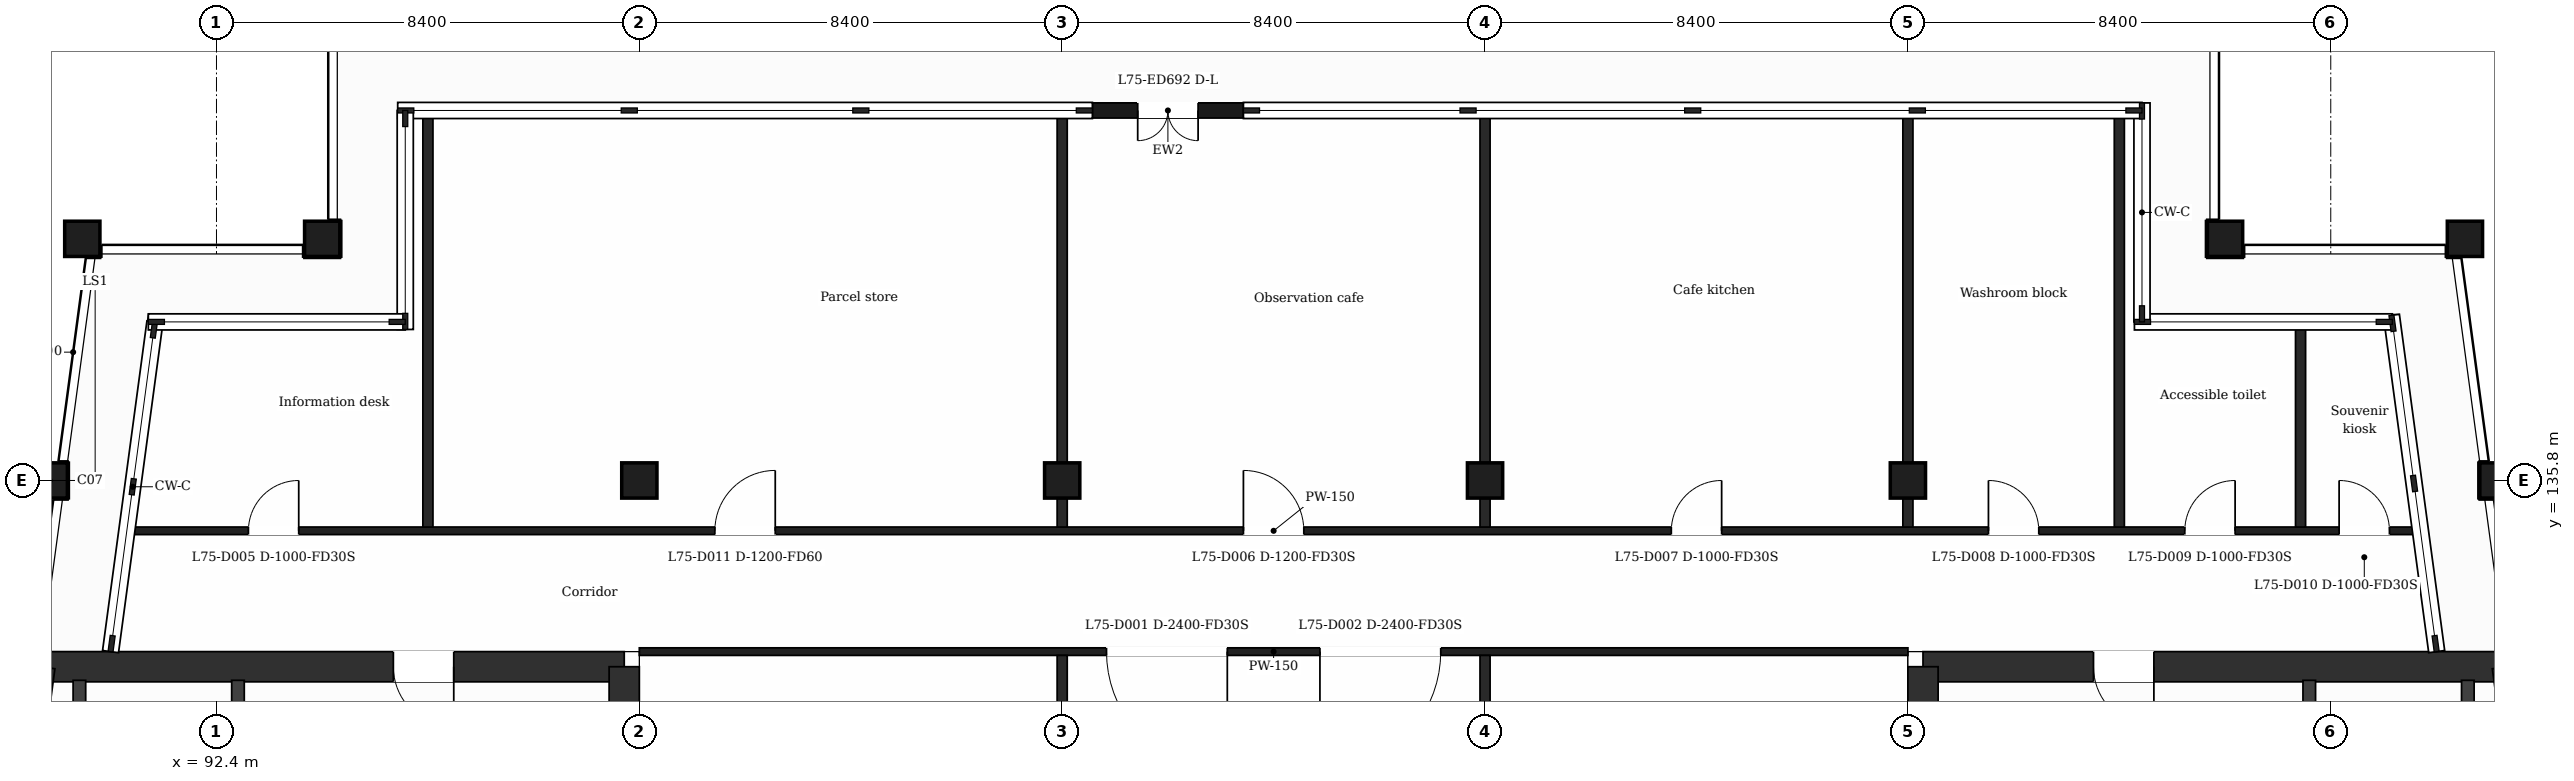
"""IFC4 building model, lengths in metres.
Left out: names, types, materials, properties, quantities, classifications, styles, units other than length and angle.
Written with IfcOpenShell. Run it as: python <this file> out.ifc"""

import sys

from ifc_helpers import new_model, si_unit, direction, frame, frame_2d, origin, origin_2d, place, context, subcontext, project, spatial, rectangle, extrude, element, fill, save


model = new_model("IFC4")
c1 = context("Model", 3, precision=1e-05, world=origin(), true_north=direction((0.0, 1.0)))
c2 = subcontext(c1, "Body", "Model", "MODEL_VIEW")
j1 = project(units=[si_unit("LENGTHUNIT", "METRE"), si_unit("PLANEANGLEUNIT", "RADIAN")], contexts=[c1])
p1 = place(None, origin())
s1 = spatial("IfcSite", under=j1, at=p1, CompositionType="ELEMENT")
p2 = place(p1, origin())
s2 = spatial("IfcBuilding", under=s1, at=p2, CompositionType="ELEMENT")
p3 = place(p2, frame((0.0, 0.0, 307.9)))
s3 = spatial("IfcBuildingStorey", under=s2, at=p3, CompositionType="ELEMENT", Elevation=307.9)
p4 = place(p3, frame((88.893, 132.1, 0.0), z_axis=(0.0, 0.0, 1.0), x_axis=(1.0, 0.0, 0.0)))
e1 = element("IfcWall", 1, at=p4, inside=s3, PredefinedType="SHEAR", context=c2, shape_type="SweptSolid", body=[
    extrude(rectangle(XDim=11.607, YDim=0.6, at=frame_2d((5.803, 0.0))), origin(), (0.0, 0.0, 1.0), 7.5),
])
p5 = place(p4, frame((7.021, 0.0, 0.0)))
e2 = element("IfcOpeningElement", 2, at=p5, cuts=e1, PredefinedType="OPENING", context=c2, shape_type="SweptSolid", body=[
    extrude(rectangle(XDim=1.2, YDim=2.1, at=frame_2d((0.6, 1.05))), frame((0.0, 0.31, 0.0), z_axis=(0.0, -1.0, 0.0), x_axis=(1.0, 0.0, 0.0)), (0.0, 0.0, 1.0), 0.62),
])
p6 = place(p3, frame((100.5, 132.1, 0.0), z_axis=(0.0, 0.0, 1.0), x_axis=(0.0, -1.0, 0.0)))
e3 = element("IfcWall", 3, at=p6, inside=s3, PredefinedType="SHEAR", context=c2, shape_type="SweptSolid", body=[
    extrude(rectangle(XDim=15.8, YDim=0.6, at=frame_2d((7.9, 0.0))), origin(), (0.0, 0.0, 1.0), 7.5),
])
p7 = place(p6, frame((7.95, 0.0, 0.0)))
e4 = element("IfcOpeningElement", 4, at=p7, cuts=e3, PredefinedType="OPENING", context=c2, shape_type="SweptSolid", body=[
    extrude(rectangle(XDim=1.4, YDim=2.1, at=frame_2d((0.7, 1.05))), frame((0.0, 0.31, 0.0), z_axis=(0.0, -1.0, 0.0), x_axis=(1.0, 0.0, 0.0)), (0.0, 0.0, 1.0), 0.62),
])
p8 = place(p3, frame((86.766, 116.3, 0.0), z_axis=(0.0, 0.0, 1.0), x_axis=(0.13341345841, 0.991060466932, 0.0)))
e5 = element("IfcWall", 5, at=p8, inside=s3, PredefinedType="SHEAR", context=c2, shape_type="SweptSolid", body=[
    extrude(rectangle(XDim=15.943, YDim=0.6, at=frame_2d((7.971, 0.0))), origin(), (0.0, 0.0, 1.0), 7.5),
])
p9 = place(p3, frame((126.3, 132.1, 0.0), z_axis=(0.0, 0.0, 1.0), x_axis=(1.0, 0.0, 0.0)))
e6 = element("IfcWall", 6, at=p9, inside=s3, PredefinedType="SHEAR", context=c2, shape_type="SweptSolid", body=[
    extrude(rectangle(XDim=11.607, YDim=0.6, at=frame_2d((5.803, 0.0))), origin(), (0.0, 0.0, 1.0), 7.5),
])
p10 = place(p9, frame((3.386, 0.0, 0.0)))
e7 = element("IfcOpeningElement", 7, at=p10, cuts=e6, PredefinedType="OPENING", context=c2, shape_type="SweptSolid", body=[
    extrude(rectangle(XDim=1.2, YDim=2.1, at=frame_2d((0.6, 1.05))), frame((0.0, 0.31, 0.0), z_axis=(0.0, -1.0, 0.0), x_axis=(1.0, 0.0, 0.0)), (0.0, 0.0, 1.0), 0.62),
])
p11 = place(p3, frame((137.907, 132.1, 0.0), z_axis=(0.0, 0.0, 1.0), x_axis=(0.13341345841, -0.991060466932, 0.0)))
e8 = element("IfcWall", 8, at=p11, inside=s3, PredefinedType="SHEAR", context=c2, shape_type="SweptSolid", body=[
    extrude(rectangle(XDim=15.943, YDim=0.6, at=frame_2d((7.971, 0.0))), origin(), (0.0, 0.0, 1.0), 7.5),
])
p12 = place(p3, frame((126.3, 116.3, 0.0), z_axis=(0.0, 0.0, 1.0), x_axis=(0.0, 1.0, 0.0)))
e9 = element("IfcWall", 9, at=p12, inside=s3, PredefinedType="SHEAR", context=c2, shape_type="SweptSolid", body=[
    extrude(rectangle(XDim=15.8, YDim=0.6, at=frame_2d((7.9, 0.0))), origin(), (0.0, 0.0, 1.0), 7.5),
])
p13 = place(p12, frame((6.45, 0.0, 0.0)))
e10 = element("IfcOpeningElement", 10, at=p13, cuts=e9, PredefinedType="OPENING", context=c2, shape_type="SweptSolid", body=[
    extrude(rectangle(XDim=1.4, YDim=2.1, at=frame_2d((0.7, 1.05))), frame((0.0, 0.31, 0.0), z_axis=(0.0, -1.0, 0.0), x_axis=(1.0, 0.0, 0.0)), (0.0, 0.0, 1.0), 0.62),
])
for number, where, z_axis, x_axis in (
    (11, (94.5, 140.6, 0.0), (0.0, 0.0, 1.0), (1.0, 0.0, 0.0)),
    (12, (132.3, 140.6, 0.0), (0.0, 0.0, 1.0), (1.0, 0.0, 0.0)),
    (13, (89.735, 140.6, 0.0), (0.0, 0.0, 1.0), (1.0, 0.0, 0.0)),
    (14, (137.065, 140.6, 0.0), (0.0, 0.0, 1.0), (1.0, 0.0, 0.0)),
    (15, (100.8, 135.8, 0.0), (0.0, 0.0, 1.0), (1.0, 0.0, 0.0)),
    (16, (109.2, 135.8, 0.0), (0.0, 0.0, 1.0), (1.0, 0.0, 0.0)),
    (17, (117.6, 135.8, 0.0), (0.0, 0.0, 1.0), (1.0, 0.0, 0.0)),
    (18, (126.0, 135.8, 0.0), (0.0, 0.0, 1.0), (1.0, 0.0, 0.0)),
    (19, (89.088, 135.8, 0.0), (0.0, 0.0, 1.0), (1.0, 0.0, 0.0)),
    (20, (137.711, 135.8, 0.0), (0.0, 0.0, 1.0), (1.0, 0.0, 0.0)),
):
    element("IfcColumn", number, at=place(p3, frame(where, z_axis=z_axis, x_axis=x_axis)), inside=s3, PredefinedType="COLUMN", context=c2, shape_type="SweptSolid", body=[
        extrude(rectangle(XDim=0.7, YDim=0.7, at=origin_2d()), origin(), (0.0, 0.0, 1.0), 7.5),
    ])
p14 = place(p3, frame((112.8, 143.15, 0.0), z_axis=(0.0, 0.0, 1.0), x_axis=(-1.0, 0.0, 0.0)))
e21 = element("IfcWall", 21, at=p14, inside=s3, PredefinedType="SOLIDWALL", context=c2, shape_type="SweptSolid", body=[
    extrude(rectangle(XDim=3.0, YDim=0.3, at=frame_2d((1.5, 0.0))), origin(), (0.0, 0.0, 1.0), 7.05),
])
p15 = place(p14, frame((0.9, 0.0, 0.0)))
e22 = element("IfcOpeningElement", 22, at=p15, cuts=e21, PredefinedType="OPENING", context=c2, shape_type="SweptSolid", body=[
    extrude(rectangle(XDim=1.2, YDim=2.4, at=frame_2d((0.6, 1.2))), frame((0.0, 0.16, 0.0), z_axis=(0.0, -1.0, 0.0), x_axis=(1.0, 0.0, 0.0)), (0.0, 0.0, 1.0), 0.32),
])
p16 = place(p3, frame((100.8, 132.4, 0.0), z_axis=(0.0, 0.0, 1.0), x_axis=(1.0, 0.0, 0.0)))
e23 = element("IfcWall", 23, at=p16, inside=s3, PredefinedType="PARTITIONING", context=c2, shape_type="SweptSolid", body=[
    extrude(rectangle(XDim=25.2, YDim=0.15, at=frame_2d((12.6, 0.0))), origin(), (0.0, 0.0, 1.0), 7.05),
])
p17 = place(p16, frame((9.28, 0.0, 0.0)))
e24 = element("IfcOpeningElement", 24, at=p17, cuts=e23, PredefinedType="OPENING", context=c2, shape_type="SweptSolid", body=[
    extrude(rectangle(XDim=2.4, YDim=2.1, at=frame_2d((1.2, 1.05))), frame((0.0, 0.085, 0.0), z_axis=(0.0, -1.0, 0.0), x_axis=(1.0, 0.0, 0.0)), (0.0, 0.0, 1.0), 0.17),
])
p18 = place(p16, frame((13.52, 0.0, 0.0)))
e25 = element("IfcOpeningElement", 25, at=p18, cuts=e23, PredefinedType="OPENING", context=c2, shape_type="SweptSolid", body=[
    extrude(rectangle(XDim=2.4, YDim=2.1, at=frame_2d((1.2, 1.05))), frame((0.0, 0.085, 0.0), z_axis=(0.0, -1.0, 0.0), x_axis=(1.0, 0.0, 0.0)), (0.0, 0.0, 1.0), 0.17),
])
p19 = place(p3, frame((90.73, 134.8, 0.0), z_axis=(0.0, 0.0, 1.0), x_axis=(1.0, 0.0, 0.0)))
e26 = element("IfcWall", 26, at=p19, inside=s3, PredefinedType="PARTITIONING", context=c2, shape_type="SweptSolid", body=[
    extrude(rectangle(XDim=45.341, YDim=0.15, at=frame_2d((22.67, 0.0))), origin(), (0.0, 0.0, 1.0), 7.05),
])
p20 = place(p19, frame((2.304, 0.0, 0.0)))
e27 = element("IfcOpeningElement", 27, at=p20, cuts=e26, PredefinedType="OPENING", context=c2, shape_type="SweptSolid", body=[
    extrude(rectangle(XDim=1.0, YDim=2.1, at=frame_2d((0.5, 1.05))), frame((0.0, 0.085, 0.0), z_axis=(0.0, -1.0, 0.0), x_axis=(1.0, 0.0, 0.0)), (0.0, 0.0, 1.0), 0.17),
])
p21 = place(p19, frame((22.07, 0.0, 0.0)))
e28 = element("IfcOpeningElement", 28, at=p21, cuts=e26, PredefinedType="OPENING", context=c2, shape_type="SweptSolid", body=[
    extrude(rectangle(XDim=1.2, YDim=2.1, at=frame_2d((0.6, 1.05))), frame((0.0, 0.085, 0.0), z_axis=(0.0, -1.0, 0.0), x_axis=(1.0, 0.0, 0.0)), (0.0, 0.0, 1.0), 0.17),
])
p22 = place(p19, frame((30.57, 0.0, 0.0)))
e29 = element("IfcOpeningElement", 29, at=p22, cuts=e26, PredefinedType="OPENING", context=c2, shape_type="SweptSolid", body=[
    extrude(rectangle(XDim=1.0, YDim=2.1, at=frame_2d((0.5, 1.05))), frame((0.0, 0.085, 0.0), z_axis=(0.0, -1.0, 0.0), x_axis=(1.0, 0.0, 0.0)), (0.0, 0.0, 1.0), 0.17),
])
p23 = place(p19, frame((36.87, 0.0, 0.0)))
e30 = element("IfcOpeningElement", 30, at=p23, cuts=e26, PredefinedType="OPENING", context=c2, shape_type="SweptSolid", body=[
    extrude(rectangle(XDim=1.0, YDim=2.1, at=frame_2d((0.5, 1.05))), frame((0.0, 0.085, 0.0), z_axis=(0.0, -1.0, 0.0), x_axis=(1.0, 0.0, 0.0)), (0.0, 0.0, 1.0), 0.17),
])
p24 = place(p19, frame((40.77, 0.0, 0.0)))
e31 = element("IfcOpeningElement", 31, at=p24, cuts=e26, PredefinedType="OPENING", context=c2, shape_type="SweptSolid", body=[
    extrude(rectangle(XDim=1.0, YDim=2.1, at=frame_2d((0.5, 1.05))), frame((0.0, 0.085, 0.0), z_axis=(0.0, -1.0, 0.0), x_axis=(1.0, 0.0, 0.0)), (0.0, 0.0, 1.0), 0.17),
])
p25 = place(p19, frame((43.836, 0.0, 0.0)))
e32 = element("IfcOpeningElement", 32, at=p25, cuts=e26, PredefinedType="OPENING", context=c2, shape_type="SweptSolid", body=[
    extrude(rectangle(XDim=1.0, YDim=2.1, at=frame_2d((0.5, 1.05))), frame((0.0, 0.085, 0.0), z_axis=(0.0, -1.0, 0.0), x_axis=(1.0, 0.0, 0.0)), (0.0, 0.0, 1.0), 0.17),
])
p26 = place(p19, frame((11.57, 0.0, 0.0)))
e33 = element("IfcOpeningElement", 33, at=p26, cuts=e26, PredefinedType="OPENING", context=c2, shape_type="SweptSolid", body=[
    extrude(rectangle(XDim=1.2, YDim=2.1, at=frame_2d((0.6, 1.05))), frame((0.0, 0.085, 0.0), z_axis=(0.0, -1.0, 0.0), x_axis=(1.0, 0.0, 0.0)), (0.0, 0.0, 1.0), 0.17),
])
p27 = place(p3, frame((89.677, 124.575, 0.0), z_axis=(0.0, 0.0, 1.0), x_axis=(0.0, 1.0, 0.0)))
e34 = element("IfcWall", 34, at=p27, inside=s3, PredefinedType="PARTITIONING", context=c2, shape_type="SweptSolid", body=[
    extrude(rectangle(XDim=7.255, YDim=0.25, at=frame_2d((3.627, 0.0))), origin(), (0.0, 0.0, 1.0), 7.05),
])
p28 = place(p3, frame((92.827, 124.575, 0.0), z_axis=(0.0, 0.0, 1.0), x_axis=(0.0, 1.0, 0.0)))
e35 = element("IfcWall", 35, at=p28, inside=s3, PredefinedType="PARTITIONING", context=c2, shape_type="SweptSolid", body=[
    extrude(rectangle(XDim=7.255, YDim=0.25, at=frame_2d((3.627, 0.0))), origin(), (0.0, 0.0, 1.0), 7.05),
])
p29 = place(p28, frame((5.325, 0.0, 0.0)))
e36 = element("IfcOpeningElement", 36, at=p29, cuts=e35, PredefinedType="OPENING", context=c2, shape_type="SweptSolid", body=[
    extrude(rectangle(XDim=1.0, YDim=2.1, at=frame_2d((0.5, 1.05))), frame((0.0, 0.135, 0.0), z_axis=(0.0, -1.0, 0.0), x_axis=(1.0, 0.0, 0.0)), (0.0, 0.0, 1.0), 0.27),
])
p30 = place(p3, frame((96.6, 134.875, 0.0), z_axis=(0.0, 0.0, 1.0), x_axis=(0.0, 1.0, 0.0)))
e37 = element("IfcWall", 37, at=p30, inside=s3, PredefinedType="PARTITIONING", context=c2, shape_type="SweptSolid", body=[
    extrude(rectangle(XDim=8.165, YDim=0.2, at=frame_2d((4.083, 0.0))), origin(), (0.0, 0.0, 1.0), 7.05),
])
p31 = place(p3, frame((109.2, 122.1, 0.0), z_axis=(0.0, 0.0, 1.0), x_axis=(0.0, 1.0, 0.0)))
e38 = element("IfcWall", 38, at=p31, inside=s3, PredefinedType="PARTITIONING", context=c2, shape_type="SweptSolid", body=[
    extrude(rectangle(XDim=10.225, YDim=0.2, at=frame_2d((5.112, 0.0))), origin(), (0.0, 0.0, 1.0), 7.05),
])
p32 = place(p31, frame((4.5, 0.0, 0.0)))
e39 = element("IfcOpeningElement", 39, at=p32, cuts=e38, PredefinedType="OPENING", context=c2, shape_type="SweptSolid", body=[
    extrude(rectangle(XDim=1.2, YDim=2.1, at=frame_2d((0.6, 1.05))), frame((0.0, 0.11, 0.0), z_axis=(0.0, -1.0, 0.0), x_axis=(1.0, 0.0, 0.0)), (0.0, 0.0, 1.0), 0.22),
])
p33 = place(p3, frame((109.2, 134.875, 0.0), z_axis=(0.0, 0.0, 1.0), x_axis=(0.0, 1.0, 0.0)))
e40 = element("IfcWall", 40, at=p33, inside=s3, PredefinedType="PARTITIONING", context=c2, shape_type="SweptSolid", body=[
    extrude(rectangle(XDim=8.165, YDim=0.2, at=frame_2d((4.083, 0.0))), origin(), (0.0, 0.0, 1.0), 7.05),
])
p34 = place(p3, frame((117.6, 122.1, 0.0), z_axis=(0.0, 0.0, 1.0), x_axis=(0.0, 1.0, 0.0)))
e41 = element("IfcWall", 41, at=p34, inside=s3, PredefinedType="PARTITIONING", context=c2, shape_type="SweptSolid", body=[
    extrude(rectangle(XDim=10.225, YDim=0.2, at=frame_2d((5.112, 0.0))), origin(), (0.0, 0.0, 1.0), 7.05),
])
p35 = place(p34, frame((4.6, 0.0, 0.0)))
e42 = element("IfcOpeningElement", 42, at=p35, cuts=e41, PredefinedType="OPENING", context=c2, shape_type="SweptSolid", body=[
    extrude(rectangle(XDim=1.0, YDim=2.1, at=frame_2d((0.5, 1.05))), frame((0.0, 0.11, 0.0), z_axis=(0.0, -1.0, 0.0), x_axis=(1.0, 0.0, 0.0)), (0.0, 0.0, 1.0), 0.22),
])
for number, where, z_axis, x_axis in (
    (43, (117.6, 134.875, 0.0), (0.0, 0.0, 1.0), (0.0, 1.0, 0.0)),
    (44, (126.0, 134.875, 0.0), (0.0, 0.0, 1.0), (0.0, 1.0, 0.0)),
    (45, (130.2, 134.875, 0.0), (0.0, 0.0, 1.0), (0.0, 1.0, 0.0)),
):
    element("IfcWall", number, at=place(p3, frame(where, z_axis=z_axis, x_axis=x_axis)), inside=s3, PredefinedType="PARTITIONING", context=c2, shape_type="SweptSolid", body=[
        extrude(rectangle(XDim=8.165, YDim=0.2, at=frame_2d((4.083, 0.0))), origin(), (0.0, 0.0, 1.0), 7.05),
    ])
p36 = place(p3, frame((133.8, 134.875, 0.0), z_axis=(0.0, 0.0, 1.0), x_axis=(0.0, 1.0, 0.0)))
e46 = element("IfcWall", 46, at=p36, inside=s3, PredefinedType="PARTITIONING", context=c2, shape_type="SweptSolid", body=[
    extrude(rectangle(XDim=3.965, YDim=0.2, at=frame_2d((1.982, 0.0))), origin(), (0.0, 0.0, 1.0), 7.05),
])
p37 = place(p3, frame((133.973, 124.575, 0.0), z_axis=(0.0, 0.0, 1.0), x_axis=(0.0, 1.0, 0.0)))
e47 = element("IfcWall", 47, at=p37, inside=s3, PredefinedType="PARTITIONING", context=c2, shape_type="SweptSolid", body=[
    extrude(rectangle(XDim=7.255, YDim=0.25, at=frame_2d((3.627, 0.0))), origin(), (0.0, 0.0, 1.0), 7.05),
])
p38 = place(p37, frame((5.325, 0.0, 0.0)))
e48 = element("IfcOpeningElement", 48, at=p38, cuts=e47, PredefinedType="OPENING", context=c2, shape_type="SweptSolid", body=[
    extrude(rectangle(XDim=1.0, YDim=2.1, at=frame_2d((0.5, 1.05))), frame((0.0, 0.135, 0.0), z_axis=(0.0, -1.0, 0.0), x_axis=(1.0, 0.0, 0.0)), (0.0, 0.0, 1.0), 0.27),
])
p39 = place(p3, frame((137.123, 124.575, 0.0), z_axis=(0.0, 0.0, 1.0), x_axis=(0.0, 1.0, 0.0)))
e49 = element("IfcWall", 49, at=p39, inside=s3, PredefinedType="PARTITIONING", context=c2, shape_type="SweptSolid", body=[
    extrude(rectangle(XDim=7.255, YDim=0.25, at=frame_2d((3.627, 0.0))), origin(), (0.0, 0.0, 1.0), 7.05),
])
p40 = place(p15, origin())
e50 = element("IfcDoor", 50, at=p40, inside=s3, OperationType="DOUBLE_DOOR_SINGLE_SWING", PredefinedType="DOOR", context=c2, shape_type="SweptSolid", body=[
    extrude(rectangle(XDim=1.2, YDim=2.4, at=frame_2d((0.6, 1.2))), frame((0.0, 0.025, 0.0), z_axis=(0.0, -1.0, 0.0), x_axis=(1.0, 0.0, 0.0)), (0.0, 0.0, 1.0), 0.05),
])
fill(e22, e50)
p41 = place(p17, origin())
e51 = element("IfcDoor", 51, at=p41, inside=s3, OperationType="SINGLE_SWING_RIGHT", PredefinedType="DOOR", context=c2, shape_type="SweptSolid", body=[
    extrude(rectangle(XDim=2.4, YDim=2.1, at=frame_2d((1.2, 1.05))), frame((0.0, 0.025, 0.0), z_axis=(0.0, -1.0, 0.0), x_axis=(1.0, 0.0, 0.0)), (0.0, 0.0, 1.0), 0.05),
])
fill(e24, e51)
p42 = place(p18, origin())
e52 = element("IfcDoor", 52, at=p42, inside=s3, OperationType="SINGLE_SWING_LEFT", PredefinedType="DOOR", context=c2, shape_type="SweptSolid", body=[
    extrude(rectangle(XDim=2.4, YDim=2.1, at=frame_2d((1.2, 1.05))), frame((0.0, 0.025, 0.0), z_axis=(0.0, -1.0, 0.0), x_axis=(1.0, 0.0, 0.0)), (0.0, 0.0, 1.0), 0.05),
])
fill(e25, e52)
p43 = place(p20, origin())
e53 = element("IfcDoor", 53, at=p43, inside=s3, OperationType="SINGLE_SWING_RIGHT", PredefinedType="DOOR", context=c2, shape_type="SweptSolid", body=[
    extrude(rectangle(XDim=1.0, YDim=2.1, at=frame_2d((0.5, 1.05))), frame((0.0, 0.025, 0.0), z_axis=(0.0, -1.0, 0.0), x_axis=(1.0, 0.0, 0.0)), (0.0, 0.0, 1.0), 0.05),
])
fill(e27, e53)
p44 = place(p21, origin())
e54 = element("IfcDoor", 54, at=p44, inside=s3, OperationType="SINGLE_SWING_LEFT", PredefinedType="DOOR", context=c2, shape_type="SweptSolid", body=[
    extrude(rectangle(XDim=1.2, YDim=2.1, at=frame_2d((0.6, 1.05))), frame((0.0, 0.025, 0.0), z_axis=(0.0, -1.0, 0.0), x_axis=(1.0, 0.0, 0.0)), (0.0, 0.0, 1.0), 0.05),
])
fill(e28, e54)
p45 = place(p22, origin())
e55 = element("IfcDoor", 55, at=p45, inside=s3, OperationType="SINGLE_SWING_RIGHT", PredefinedType="DOOR", context=c2, shape_type="SweptSolid", body=[
    extrude(rectangle(XDim=1.0, YDim=2.1, at=frame_2d((0.5, 1.05))), frame((0.0, 0.025, 0.0), z_axis=(0.0, -1.0, 0.0), x_axis=(1.0, 0.0, 0.0)), (0.0, 0.0, 1.0), 0.05),
])
fill(e29, e55)
p46 = place(p23, origin())
e56 = element("IfcDoor", 56, at=p46, inside=s3, OperationType="SINGLE_SWING_LEFT", PredefinedType="DOOR", context=c2, shape_type="SweptSolid", body=[
    extrude(rectangle(XDim=1.0, YDim=2.1, at=frame_2d((0.5, 1.05))), frame((0.0, 0.025, 0.0), z_axis=(0.0, -1.0, 0.0), x_axis=(1.0, 0.0, 0.0)), (0.0, 0.0, 1.0), 0.05),
])
fill(e30, e56)
p47 = place(p24, origin())
e57 = element("IfcDoor", 57, at=p47, inside=s3, OperationType="SINGLE_SWING_RIGHT", PredefinedType="DOOR", context=c2, shape_type="SweptSolid", body=[
    extrude(rectangle(XDim=1.0, YDim=2.1, at=frame_2d((0.5, 1.05))), frame((0.0, 0.025, 0.0), z_axis=(0.0, -1.0, 0.0), x_axis=(1.0, 0.0, 0.0)), (0.0, 0.0, 1.0), 0.05),
])
fill(e31, e57)
p48 = place(p25, origin())
e58 = element("IfcDoor", 58, at=p48, inside=s3, OperationType="SINGLE_SWING_LEFT", PredefinedType="DOOR", context=c2, shape_type="SweptSolid", body=[
    extrude(rectangle(XDim=1.0, YDim=2.1, at=frame_2d((0.5, 1.05))), frame((0.0, 0.025, 0.0), z_axis=(0.0, -1.0, 0.0), x_axis=(1.0, 0.0, 0.0)), (0.0, 0.0, 1.0), 0.05),
])
fill(e32, e58)
p49 = place(p26, origin())
e59 = element("IfcDoor", 59, at=p49, inside=s3, OperationType="SINGLE_SWING_RIGHT", PredefinedType="DOOR", context=c2, shape_type="SweptSolid", body=[
    extrude(rectangle(XDim=1.2, YDim=2.1, at=frame_2d((0.6, 1.05))), frame((0.0, 0.025, 0.0), z_axis=(0.0, -1.0, 0.0), x_axis=(1.0, 0.0, 0.0)), (0.0, 0.0, 1.0), 0.05),
])
fill(e33, e59)
p50 = place(p5, origin())
e60 = element("IfcDoor", 60, at=p50, inside=s3, OperationType="SINGLE_SWING_RIGHT", PredefinedType="DOOR", context=c2, shape_type="SweptSolid", body=[
    extrude(rectangle(XDim=1.2, YDim=2.1, at=frame_2d((0.6, 1.05))), frame((0.0, 0.025, 0.0), z_axis=(0.0, -1.0, 0.0), x_axis=(1.0, 0.0, 0.0)), (0.0, 0.0, 1.0), 0.05),
])
fill(e2, e60)
p51 = place(p10, origin())
e61 = element("IfcDoor", 61, at=p51, inside=s3, OperationType="SINGLE_SWING_RIGHT", PredefinedType="DOOR", context=c2, shape_type="SweptSolid", body=[
    extrude(rectangle(XDim=1.2, YDim=2.1, at=frame_2d((0.6, 1.05))), frame((0.0, 0.025, 0.0), z_axis=(0.0, -1.0, 0.0), x_axis=(1.0, 0.0, 0.0)), (0.0, 0.0, 1.0), 0.05),
])
fill(e7, e61)
save(model, sys.argv[1])
